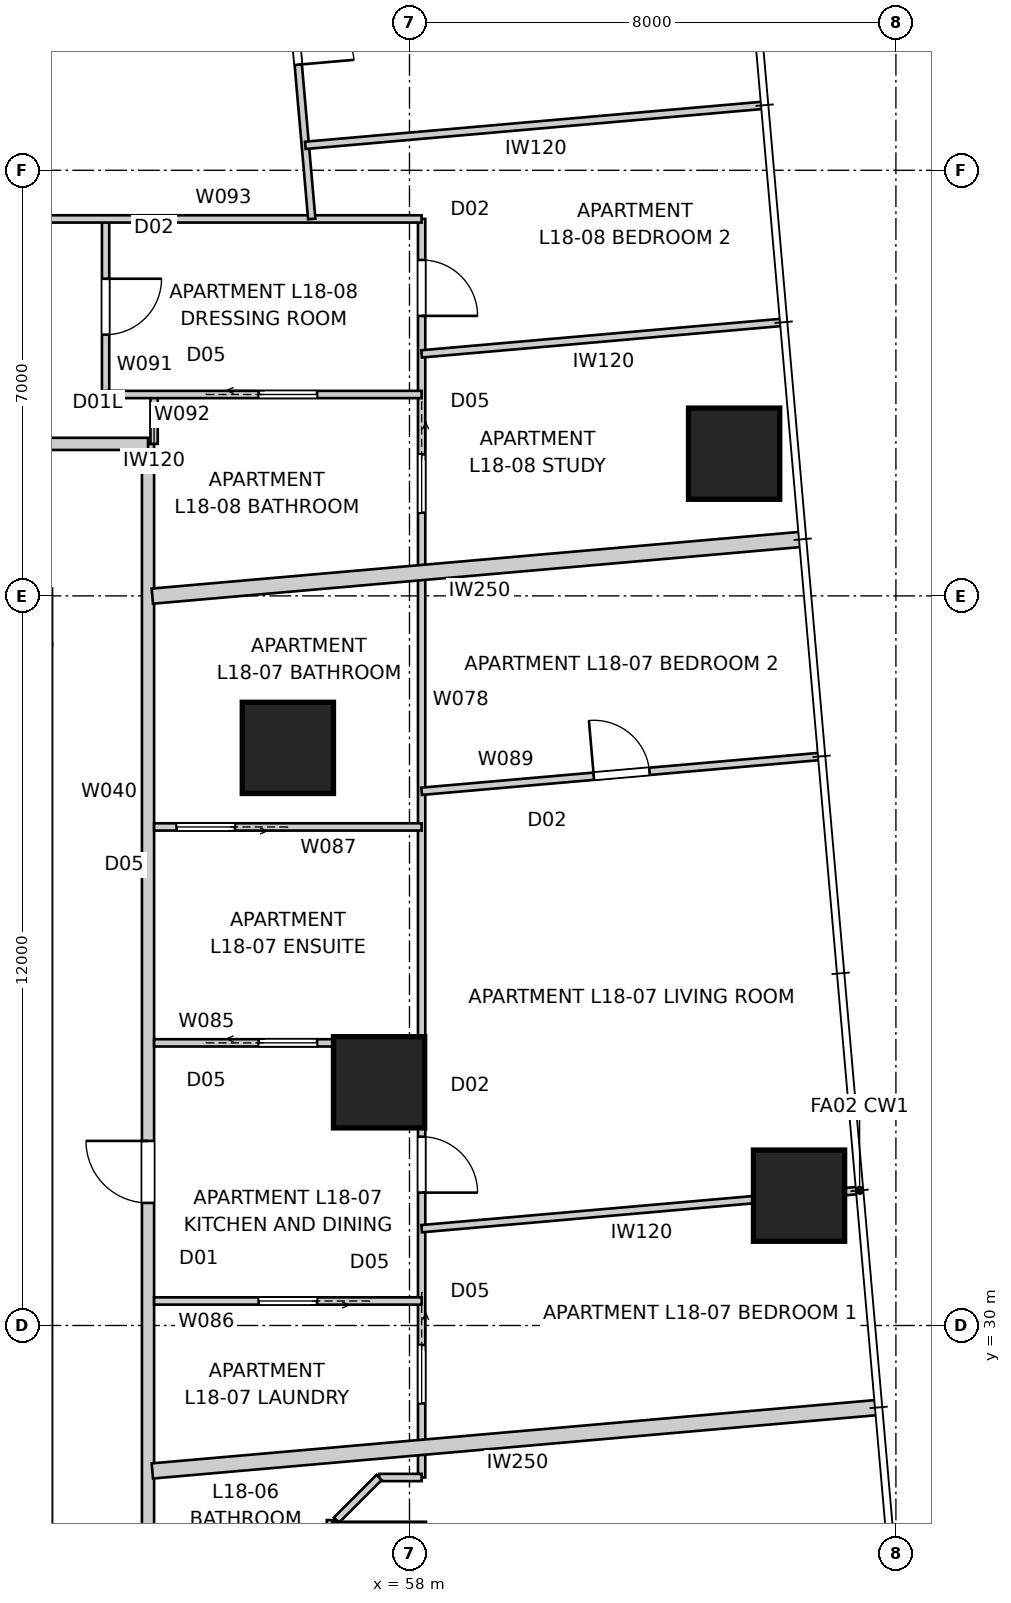
"""IFC4 building model, lengths in metres.
Left out: names, types, materials, properties, quantities, classifications, styles, units other than length and angle.
Written with IfcOpenShell. Run it as: python <this file> out.ifc"""

import sys

from ifc_helpers import new_model, si_unit, direction, frame, frame_2d, origin, origin_2d, place, context, subcontext, project, spatial, rectangle, extrude, element, fill, save


model = new_model("IFC4")
c1 = context("Model", 3, precision=1e-05, world=origin(), true_north=direction((0.0, 1.0)))
c2 = subcontext(c1, "Body", "Model", "MODEL_VIEW")
j1 = project(units=[si_unit("LENGTHUNIT", "METRE"), si_unit("PLANEANGLEUNIT", "RADIAN")], contexts=[c1])
p1 = place(None, origin())
s1 = spatial("IfcSite", under=j1, at=p1, CompositionType="ELEMENT")
p2 = place(p1, origin())
s2 = spatial("IfcBuilding", under=s1, at=p2, CompositionType="ELEMENT")
p3 = place(p2, frame((0.0, 0.0, 67.6)))
s3 = spatial("IfcBuildingStorey", under=s2, at=p3, CompositionType="ELEMENT", Elevation=67.6)
for number, where, z_axis, x_axis in (
    (1, (64.407, 32.135, 0.0), (0.0, 0.0, 1.0), (1.0, 0.0, 0.0)),
    (2, (63.339, 44.339, 0.0), (0.0, 0.0, 1.0), (1.0, 0.0, 0.0)),
    (3, (57.5, 26.0, 0.0), (0.0, 0.0, 1.0), (1.0, 0.0, 0.0)),
    (4, (57.5, 34.0, 0.0), (0.0, 0.0, 1.0), (1.0, 0.0, 0.0)),
    (5, (56.0, 39.5, 0.0), (0.0, 0.0, 1.0), (1.0, 0.0, 0.0)),
):
    element("IfcColumn", number, at=place(p3, frame(where, z_axis=z_axis, x_axis=x_axis)), inside=s3, PredefinedType="COLUMN", context=c2, shape_type="SweptSolid", body=[
        extrude(rectangle(XDim=1.5, YDim=1.5, at=origin_2d()), origin(), (0.0, 0.0, 1.0), 3.4),
    ])
p4 = place(p3, frame((53.7, 16.3, 0.0), z_axis=(0.0, 0.0, 1.0), x_axis=(0.0, 1.0, 0.0)))
e6 = element("IfcWall", 6, at=p4, inside=s3, PredefinedType="PARTITIONING", context=c2, shape_type="SweptSolid", body=[
    extrude(rectangle(XDim=28.2, YDim=0.2, at=frame_2d((14.1, 0.0))), origin(), (0.0, 0.0, 1.0), 3.25),
])
p5 = place(p4, frame((15.716, 0.0, 0.0)))
e7 = element("IfcOpeningElement", 7, at=p5, cuts=e6, PredefinedType="OPENING", context=c2, shape_type="SweptSolid", body=[
    extrude(rectangle(XDim=1.02, YDim=2.34, at=frame_2d((0.51, 1.17))), frame((0.0, 0.11, 0.0), z_axis=(0.0, -1.0, 0.0), x_axis=(1.0, 0.0, 0.0)), (0.0, 0.0, 1.0), 0.22),
])
p6 = place(p4, frame((5.572, 0.0, 0.0)))
e8 = element("IfcOpeningElement", 8, at=p6, cuts=e6, PredefinedType="OPENING", context=c2, shape_type="SweptSolid", body=[
    extrude(rectangle(XDim=1.02, YDim=2.34, at=frame_2d((0.51, 1.17))), frame((0.0, 0.11, 0.0), z_axis=(0.0, -1.0, 0.0), x_axis=(1.0, 0.0, 0.0)), (0.0, 0.0, 1.0), 0.22),
])
p7 = place(p4, frame((1.715, 0.0, 0.0)))
e9 = element("IfcOpeningElement", 9, at=p7, cuts=e6, PredefinedType="OPENING", context=c2, shape_type="SweptSolid", body=[
    extrude(rectangle(XDim=1.02, YDim=2.1, at=frame_2d((0.51, 1.05))), frame((0.0, 0.11, 0.0), z_axis=(0.0, -1.0, 0.0), x_axis=(1.0, 0.0, 0.0)), (0.0, 0.0, 1.0), 0.22),
])
p8 = place(p3, frame((53.7, 44.5, 0.0), z_axis=(0.0, 0.0, 1.0), x_axis=(-1.0, 0.0, 0.0)))
e10 = element("IfcWall", 10, at=p8, inside=s3, PredefinedType="PARTITIONING", context=c2, shape_type="SweptSolid", body=[
    extrude(rectangle(XDim=28.2, YDim=0.2, at=frame_2d((14.1, 0.0))), origin(), (0.0, 0.0, 1.0), 3.25),
])
p9 = place(p8, frame((21.321, 0.0, 0.0)))
e11 = element("IfcOpeningElement", 11, at=p9, cuts=e10, PredefinedType="OPENING", context=c2, shape_type="SweptSolid", body=[
    extrude(rectangle(XDim=1.02, YDim=2.34, at=frame_2d((0.51, 1.17))), frame((0.0, 0.11, 0.0), z_axis=(0.0, -1.0, 0.0), x_axis=(1.0, 0.0, 0.0)), (0.0, 0.0, 1.0), 0.22),
])
p10 = place(p8, frame((6.201, 0.0, 0.0)))
e12 = element("IfcOpeningElement", 12, at=p10, cuts=e10, PredefinedType="OPENING", context=c2, shape_type="SweptSolid", body=[
    extrude(rectangle(XDim=1.02, YDim=2.34, at=frame_2d((0.51, 1.17))), frame((0.0, 0.11, 0.0), z_axis=(0.0, -1.0, 0.0), x_axis=(1.0, 0.0, 0.0)), (0.0, 0.0, 1.0), 0.22),
])
p11 = place(p8, frame((1.75, 0.0, 0.0)))
e13 = element("IfcOpeningElement", 13, at=p11, cuts=e10, PredefinedType="OPENING", context=c2, shape_type="SweptSolid", body=[
    extrude(rectangle(XDim=1.02, YDim=2.1, at=frame_2d((0.51, 1.05))), frame((0.0, 0.11, 0.0), z_axis=(0.0, -1.0, 0.0), x_axis=(1.0, 0.0, 0.0)), (0.0, 0.0, 1.0), 0.22),
])
p12 = place(p3, frame((64.466, 42.932, 0.0), z_axis=(0.0, 0.0, 1.0), x_axis=(-0.996193939644, -0.08716441141, 0.0)))
e14 = element("IfcWall", 14, at=p12, inside=s3, PredefinedType="PARTITIONING", context=c2, shape_type="SweptSolid", body=[
    extrude(rectangle(XDim=10.736, YDim=0.25, at=frame_2d((5.368, 0.0))), origin(), (0.0, 0.0, 1.0), 3.25),
])
p13 = place(p3, frame((65.715, 28.653, 0.0), z_axis=(0.0, 0.0, 1.0), x_axis=(-0.996195220272, -0.087149773992, 0.0)))
e15 = element("IfcWall", 15, at=p13, inside=s3, PredefinedType="PARTITIONING", context=c2, shape_type="SweptSolid", body=[
    extrude(rectangle(XDim=11.99, YDim=0.25, at=frame_2d((5.995, 0.0))), origin(), (0.0, 0.0, 1.0), 3.25),
])
p14 = place(p3, frame((58.2, 48.2, 0.0), z_axis=(0.0, 0.0, 1.0), x_axis=(0.0, -1.0, 0.0)))
e16 = element("IfcWall", 16, at=p14, inside=s3, PredefinedType="PARTITIONING", context=c2, shape_type="SweptSolid", body=[
    extrude(rectangle(XDim=20.7, YDim=0.12, at=frame_2d((10.35, 0.0))), origin(), (0.0, 0.0, 1.0), 3.25),
])
p15 = place(p14, frame((15.095, 0.0, 0.0)))
e17 = element("IfcOpeningElement", 17, at=p15, cuts=e16, PredefinedType="OPENING", context=c2, shape_type="SweptSolid", body=[
    extrude(rectangle(XDim=0.92, YDim=2.34, at=frame_2d((0.46, 1.17))), frame((0.0, 0.07, 0.0), z_axis=(0.0, -1.0, 0.0), x_axis=(1.0, 0.0, 0.0)), (0.0, 0.0, 1.0), 0.14),
])
p16 = place(p14, frame((18.521, 0.0, 0.0)))
e18 = element("IfcOpeningElement", 18, at=p16, cuts=e16, PredefinedType="OPENING", context=c2, shape_type="SweptSolid", body=[
    extrude(rectangle(XDim=0.96, YDim=2.1, at=frame_2d((0.48, 1.05))), frame((0.0, 0.07, 0.0), z_axis=(0.0, -1.0, 0.0), x_axis=(1.0, 0.0, 0.0)), (0.0, 0.0, 1.0), 0.14),
])
p17 = place(p14, frame((0.675, 0.0, 0.0)))
e19 = element("IfcOpeningElement", 19, at=p17, cuts=e16, PredefinedType="OPENING", context=c2, shape_type="SweptSolid", body=[
    extrude(rectangle(XDim=0.92, YDim=2.34, at=frame_2d((0.46, 1.17))), frame((0.0, 0.07, 0.0), z_axis=(0.0, -1.0, 0.0), x_axis=(1.0, 0.0, 0.0)), (0.0, 0.0, 1.0), 0.14),
])
p18 = place(p14, frame((3.872, 0.0, 0.0)))
e20 = element("IfcOpeningElement", 20, at=p18, cuts=e16, PredefinedType="OPENING", context=c2, shape_type="SweptSolid", body=[
    extrude(rectangle(XDim=0.96, YDim=2.1, at=frame_2d((0.48, 1.05))), frame((0.0, 0.07, 0.0), z_axis=(0.0, -1.0, 0.0), x_axis=(1.0, 0.0, 0.0)), (0.0, 0.0, 1.0), 0.14),
])
p19 = place(p3, frame((58.2, 27.5, 0.0), z_axis=(0.0, 0.0, 1.0), x_axis=(-1.0, 0.0, 0.0)))
e21 = element("IfcWall", 21, at=p19, inside=s3, PredefinedType="PARTITIONING", context=c2, shape_type="SweptSolid", body=[
    extrude(rectangle(XDim=0.7, YDim=0.12, at=frame_2d((0.35, 0.0))), origin(), (0.0, 0.0, 1.0), 3.25),
])
p20 = place(p3, frame((57.5, 27.5, 0.0), z_axis=(0.0, 0.0, 1.0), x_axis=(-0.707106781187, -0.707106781187, 0.0)))
e22 = element("IfcWall", 22, at=p20, inside=s3, PredefinedType="PARTITIONING", context=c2, shape_type="SweptSolid", body=[
    extrude(rectangle(XDim=0.99, YDim=0.12, at=frame_2d((0.495, 0.0))), origin(), (0.0, 0.0, 1.0), 3.25),
])
p21 = place(p3, frame((56.7, 26.8, 0.0), z_axis=(0.0, 0.0, 1.0), x_axis=(0.0, -1.0, 0.0)))
e23 = element("IfcWall", 23, at=p21, inside=s3, PredefinedType="PARTITIONING", context=c2, shape_type="SweptSolid", body=[
    extrude(rectangle(XDim=1.6, YDim=0.12, at=frame_2d((0.8, 0.0))), origin(), (0.0, 0.0, 1.0), 3.25),
])
p22 = place(p3, frame((53.8, 34.648, 0.0), z_axis=(0.0, 0.0, 1.0), x_axis=(1.0, 0.0, 0.0)))
e24 = element("IfcWall", 24, at=p22, inside=s3, PredefinedType="PARTITIONING", context=c2, shape_type="SweptSolid", body=[
    extrude(rectangle(XDim=4.4, YDim=0.12, at=frame_2d((2.2, 0.0))), origin(), (0.0, 0.0, 1.0), 3.25),
])
p23 = place(p22, frame((1.72, 0.0, 0.0)))
e25 = element("IfcOpeningElement", 25, at=p23, cuts=e24, PredefinedType="OPENING", context=c2, shape_type="SweptSolid", body=[
    extrude(rectangle(XDim=0.96, YDim=2.1, at=frame_2d((0.48, 1.05))), frame((0.0, 0.07, 0.0), z_axis=(0.0, -1.0, 0.0), x_axis=(1.0, 0.0, 0.0)), (0.0, 0.0, 1.0), 0.14),
])
p24 = place(p3, frame((58.2, 30.403, 0.0), z_axis=(0.0, 0.0, 1.0), x_axis=(-1.0, 0.0, 0.0)))
e26 = element("IfcWall", 26, at=p24, inside=s3, PredefinedType="PARTITIONING", context=c2, shape_type="SweptSolid", body=[
    extrude(rectangle(XDim=4.4, YDim=0.12, at=frame_2d((2.2, 0.0))), origin(), (0.0, 0.0, 1.0), 3.25),
])
p25 = place(p24, frame((1.72, 0.0, 0.0)))
e27 = element("IfcOpeningElement", 27, at=p25, cuts=e26, PredefinedType="OPENING", context=c2, shape_type="SweptSolid", body=[
    extrude(rectangle(XDim=0.96, YDim=2.1, at=frame_2d((0.48, 1.05))), frame((0.0, 0.07, 0.0), z_axis=(0.0, -1.0, 0.0), x_axis=(1.0, 0.0, 0.0)), (0.0, 0.0, 1.0), 0.14),
])
p26 = place(p3, frame((58.2, 38.2, 0.0), z_axis=(0.0, 0.0, 1.0), x_axis=(-1.0, 0.0, 0.0)))
e28 = element("IfcWall", 28, at=p26, inside=s3, PredefinedType="PARTITIONING", context=c2, shape_type="SweptSolid", body=[
    extrude(rectangle(XDim=4.4, YDim=0.12, at=frame_2d((2.2, 0.0))), origin(), (0.0, 0.0, 1.0), 3.25),
])
p27 = place(p26, frame((3.07, 0.0, 0.0)))
e29 = element("IfcOpeningElement", 29, at=p27, cuts=e28, PredefinedType="OPENING", context=c2, shape_type="SweptSolid", body=[
    extrude(rectangle(XDim=0.96, YDim=2.1, at=frame_2d((0.48, 1.05))), frame((0.0, 0.07, 0.0), z_axis=(0.0, -1.0, 0.0), x_axis=(1.0, 0.0, 0.0)), (0.0, 0.0, 1.0), 0.14),
])
p28 = place(p3, frame((65.363, 32.219, 0.0), z_axis=(0.0, 0.0, 1.0), x_axis=(-0.996194454549, -0.087158526409, 0.0)))
e30 = element("IfcWall", 30, at=p28, inside=s3, PredefinedType="PARTITIONING", context=c2, shape_type="SweptSolid", body=[
    extrude(rectangle(XDim=7.19, YDim=0.12, at=frame_2d((3.595, 0.0))), origin(), (0.0, 0.0, 1.0), 3.25),
])
p29 = place(p3, frame((58.2, 38.786, 0.0), z_axis=(0.0, 0.0, 1.0), x_axis=(0.996195090105, 0.087151261897, 0.0)))
e31 = element("IfcWall", 31, at=p29, inside=s3, PredefinedType="PARTITIONING", context=c2, shape_type="SweptSolid", body=[
    extrude(rectangle(XDim=6.563, YDim=0.12, at=frame_2d((3.282, 0.0))), origin(), (0.0, 0.0, 1.0), 3.25),
])
p30 = place(p29, frame((2.842, 0.0, 0.0)))
e32 = element("IfcOpeningElement", 32, at=p30, cuts=e31, PredefinedType="OPENING", context=c2, shape_type="SweptSolid", body=[
    extrude(rectangle(XDim=0.92, YDim=2.34, at=frame_2d((0.46, 1.17))), frame((0.0, 0.07, 0.0), z_axis=(0.0, -1.0, 0.0), x_axis=(1.0, 0.0, 0.0)), (0.0, 0.0, 1.0), 0.14),
])
p31 = place(p3, frame((53.8, 45.312, 0.0), z_axis=(0.0, 0.0, 1.0), x_axis=(0.0, -1.0, 0.0)))
e33 = element("IfcWall", 33, at=p31, inside=s3, PredefinedType="PARTITIONING", context=c2, shape_type="SweptSolid", body=[
    extrude(rectangle(XDim=0.812, YDim=0.12, at=frame_2d((0.406, 0.0))), origin(), (0.0, 0.0, 1.0), 3.25),
])
p32 = place(p3, frame((53.002, 48.2, 0.0), z_axis=(0.0, 0.0, 1.0), x_axis=(0.0, -1.0, 0.0)))
e34 = element("IfcWall", 34, at=p32, inside=s3, PredefinedType="PARTITIONING", context=c2, shape_type="SweptSolid", body=[
    extrude(rectangle(XDim=2.887, YDim=0.12, at=frame_2d((1.444, 0.0))), origin(), (0.0, 0.0, 1.0), 2.638),
])
p33 = place(p32, frame((0.984, 0.0, 0.0)))
e35 = element("IfcOpeningElement", 35, at=p33, cuts=e34, PredefinedType="OPENING", context=c2, shape_type="SweptSolid", body=[
    extrude(rectangle(XDim=0.92, YDim=2.34, at=frame_2d((0.46, 1.17))), frame((0.0, 0.07, 0.0), z_axis=(0.0, -1.0, 0.0), x_axis=(1.0, 0.0, 0.0)), (0.0, 0.0, 1.0), 0.14),
])
p34 = place(p3, frame((53.002, 45.312, 0.0), z_axis=(0.0, 0.0, 1.0), x_axis=(1.0, 0.0, 0.0)))
e36 = element("IfcWall", 36, at=p34, inside=s3, PredefinedType="PARTITIONING", context=c2, shape_type="SweptSolid", body=[
    extrude(rectangle(XDim=5.198, YDim=0.12, at=frame_2d((2.599, 0.0))), origin(), (0.0, 0.0, 1.0), 3.25),
])
p35 = place(p34, frame((2.518, 0.0, 0.0)))
e37 = element("IfcOpeningElement", 37, at=p35, cuts=e36, PredefinedType="OPENING", context=c2, shape_type="SweptSolid", body=[
    extrude(rectangle(XDim=0.96, YDim=2.1, at=frame_2d((0.48, 1.05))), frame((0.0, 0.07, 0.0), z_axis=(0.0, -1.0, 0.0), x_axis=(1.0, 0.0, 0.0)), (0.0, 0.0, 1.0), 0.14),
])
p36 = place(p3, frame((49.444, 48.2, 0.0), z_axis=(0.0, 0.0, 1.0), x_axis=(1.0, 0.0, 0.0)))
e38 = element("IfcWall", 38, at=p36, inside=s3, PredefinedType="PARTITIONING", context=c2, shape_type="SweptSolid", body=[
    extrude(rectangle(XDim=8.756, YDim=0.12, at=frame_2d((4.378, 0.0))), origin(), (0.0, 0.0, 1.0), 3.25),
])
p37 = place(p36, frame((1.319, 0.0, 0.0)))
e39 = element("IfcOpeningElement", 39, at=p37, cuts=e38, PredefinedType="OPENING", context=c2, shape_type="SweptSolid", body=[
    extrude(rectangle(XDim=0.92, YDim=2.34, at=frame_2d((0.46, 1.17))), frame((0.0, 0.07, 0.0), z_axis=(0.0, -1.0, 0.0), x_axis=(1.0, 0.0, 0.0)), (0.0, 0.0, 1.0), 0.14),
])
p38 = place(p3, frame((55.629, 56.925, 0.0), z_axis=(0.0, 0.0, 1.0), x_axis=(0.087169716747, -0.996193475426, 0.0)))
e40 = element("IfcWall", 40, at=p38, inside=s3, PredefinedType="PARTITIONING", context=c2, shape_type="SweptSolid", body=[
    extrude(rectangle(XDim=8.758, YDim=0.12, at=frame_2d((4.379, 0.0))), origin(), (0.0, 0.0, 1.0), 3.25),
])
p39 = place(p38, frame((1.525, 0.0, 0.0)))
e41 = element("IfcOpeningElement", 41, at=p39, cuts=e40, PredefinedType="OPENING", context=c2, shape_type="SweptSolid", body=[
    extrude(rectangle(XDim=0.92, YDim=2.34, at=frame_2d((0.46, 1.17))), frame((0.0, 0.07, 0.0), z_axis=(0.0, -1.0, 0.0), x_axis=(1.0, 0.0, 0.0)), (0.0, 0.0, 1.0), 0.14),
])
p40 = place(p38, frame((5.292, 0.0, 0.0)))
e42 = element("IfcOpeningElement", 42, at=p40, cuts=e40, PredefinedType="OPENING", context=c2, shape_type="SweptSolid", body=[
    extrude(rectangle(XDim=0.92, YDim=2.34, at=frame_2d((0.46, 1.17))), frame((0.0, 0.07, 0.0), z_axis=(0.0, -1.0, 0.0), x_axis=(1.0, 0.0, 0.0)), (0.0, 0.0, 1.0), 0.14),
])
p41 = place(p3, frame((63.802, 50.067, 0.0), z_axis=(0.0, 0.0, 1.0), x_axis=(-0.996194420069, -0.087158920508, 0.0)))
e43 = element("IfcWall", 43, at=p41, inside=s3, PredefinedType="PARTITIONING", context=c2, shape_type="SweptSolid", body=[
    extrude(rectangle(XDim=7.543, YDim=0.12, at=frame_2d((3.772, 0.0))), origin(), (0.0, 0.0, 1.0), 3.25),
])
p42 = place(p3, frame((64.114, 46.498, 0.0), z_axis=(0.0, 0.0, 1.0), x_axis=(-0.996195547509, -0.087146033323, 0.0)))
e44 = element("IfcWall", 44, at=p42, inside=s3, PredefinedType="PARTITIONING", context=c2, shape_type="SweptSolid", body=[
    extrude(rectangle(XDim=5.937, YDim=0.12, at=frame_2d((2.968, 0.0))), origin(), (0.0, 0.0, 1.0), 2.638),
])
p43 = place(p5, origin())
e45 = element("IfcDoor", 45, at=p43, inside=s3, OperationType="SINGLE_SWING_RIGHT", PredefinedType="DOOR", context=c2, shape_type="SweptSolid", body=[
    extrude(rectangle(XDim=1.02, YDim=2.34, at=frame_2d((0.51, 1.17))), frame((0.0, 0.025, 0.0), z_axis=(0.0, -1.0, 0.0), x_axis=(1.0, 0.0, 0.0)), (0.0, 0.0, 1.0), 0.05),
])
fill(e7, e45)
p44 = place(p23, origin())
e46 = element("IfcDoor", 46, at=p44, inside=s3, OperationType="SLIDING_TO_LEFT", PredefinedType="DOOR", context=c2, shape_type="SweptSolid", body=[
    extrude(rectangle(XDim=0.96, YDim=2.1, at=frame_2d((0.48, 1.05))), frame((0.0, 0.025, 0.0), z_axis=(0.0, -1.0, 0.0), x_axis=(1.0, 0.0, 0.0)), (0.0, 0.0, 1.0), 0.05),
])
fill(e25, e46)
p45 = place(p25, origin())
e47 = element("IfcDoor", 47, at=p45, inside=s3, OperationType="SLIDING_TO_LEFT", PredefinedType="DOOR", context=c2, shape_type="SweptSolid", body=[
    extrude(rectangle(XDim=0.96, YDim=2.1, at=frame_2d((0.48, 1.05))), frame((0.0, 0.025, 0.0), z_axis=(0.0, -1.0, 0.0), x_axis=(1.0, 0.0, 0.0)), (0.0, 0.0, 1.0), 0.05),
])
fill(e27, e47)
p46 = place(p15, origin())
e48 = element("IfcDoor", 48, at=p46, inside=s3, OperationType="SINGLE_SWING_RIGHT", PredefinedType="DOOR", context=c2, shape_type="SweptSolid", body=[
    extrude(rectangle(XDim=0.92, YDim=2.34, at=frame_2d((0.46, 1.17))), frame((0.0, 0.025, 0.0), z_axis=(0.0, -1.0, 0.0), x_axis=(1.0, 0.0, 0.0)), (0.0, 0.0, 1.0), 0.05),
])
fill(e17, e48)
p47 = place(p33, origin())
e49 = element("IfcDoor", 49, at=p47, inside=s3, OperationType="SINGLE_SWING_LEFT", PredefinedType="DOOR", context=c2, shape_type="SweptSolid", body=[
    extrude(rectangle(XDim=0.92, YDim=2.34, at=frame_2d((0.46, 1.17))), frame((0.0, 0.025, 0.0), z_axis=(0.0, -1.0, 0.0), x_axis=(1.0, 0.0, 0.0)), (0.0, 0.0, 1.0), 0.05),
])
fill(e35, e49)
p48 = place(p27, origin())
e50 = element("IfcDoor", 50, at=p48, inside=s3, OperationType="SLIDING_TO_LEFT", PredefinedType="DOOR", context=c2, shape_type="SweptSolid", body=[
    extrude(rectangle(XDim=0.96, YDim=2.1, at=frame_2d((0.48, 1.05))), frame((0.0, 0.025, 0.0), z_axis=(0.0, -1.0, 0.0), x_axis=(1.0, 0.0, 0.0)), (0.0, 0.0, 1.0), 0.05),
])
fill(e29, e50)
p49 = place(p16, origin())
e51 = element("IfcDoor", 51, at=p49, inside=s3, OperationType="SLIDING_TO_LEFT", PredefinedType="DOOR", context=c2, shape_type="SweptSolid", body=[
    extrude(rectangle(XDim=0.96, YDim=2.1, at=frame_2d((0.48, 1.05))), frame((0.0, 0.025, 0.0), z_axis=(0.0, -1.0, 0.0), x_axis=(1.0, 0.0, 0.0)), (0.0, 0.0, 1.0), 0.05),
])
fill(e18, e51)
p50 = place(p30, origin())
e52 = element("IfcDoor", 52, at=p50, inside=s3, OperationType="SINGLE_SWING_LEFT", PredefinedType="DOOR", context=c2, shape_type="SweptSolid", body=[
    extrude(rectangle(XDim=0.92, YDim=2.34, at=frame_2d((0.46, 1.17))), frame((0.0, 0.025, 0.0), z_axis=(0.0, -1.0, 0.0), x_axis=(1.0, 0.0, 0.0)), (0.0, 0.0, 1.0), 0.05),
])
fill(e32, e52)
p51 = place(p40, origin())
e53 = element("IfcDoor", 53, at=p51, inside=s3, OperationType="SINGLE_SWING_RIGHT", PredefinedType="DOOR", context=c2, shape_type="SweptSolid", body=[
    extrude(rectangle(XDim=0.92, YDim=2.34, at=frame_2d((0.46, 1.17))), frame((0.0, 0.025, 0.0), z_axis=(0.0, -1.0, 0.0), x_axis=(1.0, 0.0, 0.0)), (0.0, 0.0, 1.0), 0.05),
])
fill(e42, e53)
p52 = place(p35, origin())
e54 = element("IfcDoor", 54, at=p52, inside=s3, OperationType="SLIDING_TO_LEFT", PredefinedType="DOOR", context=c2, shape_type="SweptSolid", body=[
    extrude(rectangle(XDim=0.96, YDim=2.1, at=frame_2d((0.48, 1.05))), frame((0.0, 0.025, 0.0), z_axis=(0.0, -1.0, 0.0), x_axis=(1.0, 0.0, 0.0)), (0.0, 0.0, 1.0), 0.05),
])
fill(e37, e54)
p53 = place(p17, origin())
e55 = element("IfcDoor", 55, at=p53, inside=s3, OperationType="SINGLE_SWING_RIGHT", PredefinedType="DOOR", context=c2, shape_type="SweptSolid", body=[
    extrude(rectangle(XDim=0.92, YDim=2.34, at=frame_2d((0.46, 1.17))), frame((0.0, 0.025, 0.0), z_axis=(0.0, -1.0, 0.0), x_axis=(1.0, 0.0, 0.0)), (0.0, 0.0, 1.0), 0.05),
])
fill(e19, e55)
p54 = place(p18, origin())
e56 = element("IfcDoor", 56, at=p54, inside=s3, OperationType="SLIDING_TO_LEFT", PredefinedType="DOOR", context=c2, shape_type="SweptSolid", body=[
    extrude(rectangle(XDim=0.96, YDim=2.1, at=frame_2d((0.48, 1.05))), frame((0.0, 0.025, 0.0), z_axis=(0.0, -1.0, 0.0), x_axis=(1.0, 0.0, 0.0)), (0.0, 0.0, 1.0), 0.05),
])
fill(e20, e56)
save(model, sys.argv[1])
